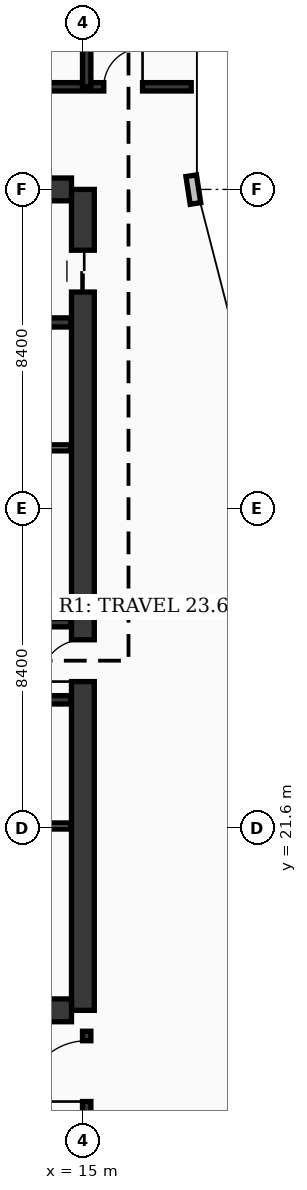
"""IFC4 building model, lengths in metres.
Left out: names, types, materials, properties, quantities, classifications, styles, units other than length and angle.
Written with IfcOpenShell. Run it as: python <this file> out.ifc"""

import sys

from ifc_helpers import new_model, si_unit, direction, frame, frame_2d, origin, place, context, subcontext, project, spatial, rectangle, extrude, element, fill, save


model = new_model("IFC4")
c1 = context("Model", 3, precision=1e-05, world=origin(), true_north=direction((0.0, 1.0)))
c2 = subcontext(c1, "Body", "Model", "MODEL_VIEW")
j1 = project(units=[si_unit("LENGTHUNIT", "METRE"), si_unit("PLANEANGLEUNIT", "RADIAN")], contexts=[c1])
p1 = place(None, origin())
s1 = spatial("IfcSite", under=j1, at=p1, CompositionType="ELEMENT")
p2 = place(p1, origin())
s2 = spatial("IfcBuilding", under=s1, at=p2, CompositionType="ELEMENT")
p3 = place(p2, frame((0.0, 0.0, 282.5)))
s3 = spatial("IfcBuildingStorey", under=s2, at=p3, CompositionType="ELEMENT", Elevation=282.5)
p4 = place(p3, frame((15.0, 16.8, 0.0), z_axis=(0.0, 0.0, 1.0), x_axis=(0.0, 1.0, 0.0)))
e1 = element("IfcWall", 1, at=p4, inside=s3, PredefinedType="SHEAR", context=c2, shape_type="SweptSolid", body=[
    extrude(rectangle(XDim=21.6, YDim=0.6, at=frame_2d((10.8, 0.0))), origin(), (0.0, 0.0, 1.0), 4.35),
])
p5 = place(p4, frame((8.65, 0.0, 0.0)))
e2 = element("IfcOpeningElement", 2, at=p5, cuts=e1, PredefinedType="OPENING", context=c2, shape_type="SweptSolid", body=[
    extrude(rectangle(XDim=1.1, YDim=2.2, at=frame_2d((0.55, 1.1))), frame((0.0, 0.31, 0.0), z_axis=(0.0, -1.0, 0.0), x_axis=(1.0, 0.0, 0.0)), (0.0, 0.0, 1.0), 0.62),
])
p6 = place(p4, frame((18.9, 0.0, 0.0)))
e3 = element("IfcOpeningElement", 3, at=p6, cuts=e1, PredefinedType="OPENING", context=c2, shape_type="SweptSolid", body=[
    extrude(rectangle(XDim=1.1, YDim=2.2, at=frame_2d((0.55, 1.1))), frame((0.0, 0.31, 0.0), z_axis=(0.0, -1.0, 0.0), x_axis=(1.0, 0.0, 0.0)), (0.0, 0.0, 1.0), 0.62),
])
p7 = place(p3, frame((4.5, 38.4, 0.0), z_axis=(0.0, 0.0, 1.0), x_axis=(1.0, 0.0, 0.0)))
e4 = element("IfcWall", 4, at=p7, inside=s3, PredefinedType="SHEAR", context=c2, shape_type="SweptSolid", body=[
    extrude(rectangle(XDim=10.2, YDim=0.6, at=frame_2d((5.1, 0.0))), origin(), (0.0, 0.0, 1.0), 4.35),
])
p8 = place(p7, frame((5.8, 0.0, 0.0)))
e5 = element("IfcOpeningElement", 5, at=p8, cuts=e4, PredefinedType="OPENING", context=c2, shape_type="SweptSolid", body=[
    extrude(rectangle(XDim=1.1, YDim=2.2, at=frame_2d((0.55, 1.1))), frame((0.0, 0.31, 0.0), z_axis=(0.0, -1.0, 0.0), x_axis=(1.0, 0.0, 0.0)), (0.0, 0.0, 1.0), 0.62),
])
p9 = place(p3, frame((4.5, 16.8, 0.0), z_axis=(0.0, 0.0, 1.0), x_axis=(1.0, 0.0, 0.0)))
e6 = element("IfcWall", 6, at=p9, inside=s3, PredefinedType="SHEAR", context=c2, shape_type="SweptSolid", body=[
    extrude(rectangle(XDim=10.2, YDim=0.6, at=frame_2d((5.1, 0.0))), origin(), (0.0, 0.0, 1.0), 4.35),
])
p10 = place(p3, frame((17.962, 38.03, 0.0), z_axis=(0.0, 0.0, 1.0), x_axis=(-0.15141125477, 0.988470855377, 0.0)))
e7 = element("IfcWall", 7, at=p10, inside=s3, PredefinedType="SOLIDWALL", context=c2, shape_type="SweptSolid", body=[
    extrude(rectangle(XDim=0.739, YDim=0.28, at=frame_2d((0.369, 0.0))), origin(), (0.0, 0.0, 1.0), 4.35),
])
p11 = place(p3, frame((9.68, 21.65, 0.0), z_axis=(0.0, 0.0, 1.0), x_axis=(1.0, 0.0, 0.0)))
e8 = element("IfcWall", 8, at=p11, inside=s3, PredefinedType="PARTITIONING", context=c2, shape_type="SweptSolid", body=[
    extrude(rectangle(XDim=5.0, YDim=0.16, at=frame_2d((2.5, 0.0))), origin(), (0.0, 0.0, 1.0), 4.35),
])
p12 = place(p11, frame((1.1, 0.0, 0.0)))
e9 = element("IfcOpeningElement", 9, at=p12, cuts=e8, PredefinedType="OPENING", context=c2, shape_type="SweptSolid", body=[
    extrude(rectangle(XDim=0.98, YDim=2.15, at=frame_2d((0.49, 1.075))), frame((0.0, 0.09, 0.0), z_axis=(0.0, -1.0, 0.0), x_axis=(1.0, 0.0, 0.0)), (0.0, 0.0, 1.0), 0.18),
])
p13 = place(p3, frame((9.68, 24.97, 0.0), z_axis=(0.0, 0.0, 1.0), x_axis=(1.0, 0.0, 0.0)))
e10 = element("IfcWall", 10, at=p13, inside=s3, PredefinedType="SOLIDWALL", context=c2, shape_type="SweptSolid", body=[
    extrude(rectangle(XDim=5.0, YDim=0.22, at=frame_2d((2.5, 0.0))), origin(), (0.0, 0.0, 1.0), 3.8),
])
p14 = place(p13, frame((0.9, 0.0, 0.0)))
e11 = element("IfcOpeningElement", 11, at=p14, cuts=e10, PredefinedType="OPENING", context=c2, shape_type="SweptSolid", body=[
    extrude(rectangle(XDim=0.98, YDim=2.15, at=frame_2d((0.49, 1.075))), frame((0.0, 0.12, 0.0), z_axis=(0.0, -1.0, 0.0), x_axis=(1.0, 0.0, 0.0)), (0.0, 0.0, 1.0), 0.24),
])
p15 = place(p3, frame((12.25, 27.0, 0.0), z_axis=(0.0, 0.0, 1.0), x_axis=(1.0, 0.0, 0.0)))
e12 = element("IfcWall", 12, at=p15, inside=s3, PredefinedType="SOLIDWALL", context=c2, shape_type="SweptSolid", body=[
    extrude(rectangle(XDim=2.43, YDim=0.22, at=frame_2d((1.215, 0.0))), origin(), (0.0, 0.0, 1.0), 4.35),
])
p16 = place(p3, frame((12.25, 31.6, 0.0), z_axis=(0.0, 0.0, 1.0), x_axis=(1.0, 0.0, 0.0)))
e13 = element("IfcWall", 13, at=p16, inside=s3, PredefinedType="PARTITIONING", context=c2, shape_type="SweptSolid", body=[
    extrude(rectangle(XDim=2.43, YDim=0.16, at=frame_2d((1.215, 0.0))), origin(), (0.0, 0.0, 1.0), 3.95),
])
p17 = place(p16, frame((0.55, 0.0, 0.0)))
e14 = element("IfcOpeningElement", 14, at=p17, cuts=e13, PredefinedType="OPENING", context=c2, shape_type="SweptSolid", body=[
    extrude(rectangle(XDim=0.98, YDim=2.15, at=frame_2d((0.49, 1.075))), frame((0.0, 0.09, 0.0), z_axis=(0.0, -1.0, 0.0), x_axis=(1.0, 0.0, 0.0)), (0.0, 0.0, 1.0), 0.18),
])
p18 = place(p3, frame((9.66, 34.9, 0.0), z_axis=(0.0, 0.0, 1.0), x_axis=(1.0, 0.0, 0.0)))
e15 = element("IfcWall", 15, at=p18, inside=s3, PredefinedType="SOLIDWALL", context=c2, shape_type="SweptSolid", body=[
    extrude(rectangle(XDim=5.02, YDim=0.24, at=frame_2d((2.51, 0.0))), origin(), (0.0, 0.0, 1.0), 4.35),
])
p19 = place(p3, frame((4.2, 41.1, 0.0), z_axis=(0.0, 0.0, 1.0), x_axis=(1.0, 0.0, 0.0)))
e16 = element("IfcWall", 16, at=p19, inside=s3, PredefinedType="SOLIDWALL", context=c2, shape_type="SweptSolid", body=[
    extrude(rectangle(XDim=13.65, YDim=0.22, at=frame_2d((6.825, 0.0))), origin(), (0.0, 0.0, 1.0), 3.8),
])
p20 = place(p19, frame((1.8, 0.0, 0.0)))
e17 = element("IfcOpeningElement", 17, at=p20, cuts=e16, PredefinedType="OPENING", context=c2, shape_type="SweptSolid", body=[
    extrude(rectangle(XDim=0.98, YDim=2.15, at=frame_2d((0.49, 1.075))), frame((0.0, 0.12, 0.0), z_axis=(0.0, -1.0, 0.0), x_axis=(1.0, 0.0, 0.0)), (0.0, 0.0, 1.0), 0.24),
])
p21 = place(p19, frame((6.8, 0.0, 0.0)))
e18 = element("IfcOpeningElement", 18, at=p21, cuts=e16, PredefinedType="OPENING", context=c2, shape_type="SweptSolid", body=[
    extrude(rectangle(XDim=1.15, YDim=2.2, at=frame_2d((0.575, 1.1))), frame((0.0, 0.12, 0.0), z_axis=(0.0, -1.0, 0.0), x_axis=(1.0, 0.0, 0.0)), (0.0, 0.0, 1.0), 0.24),
])
p22 = place(p19, frame((11.35, 0.0, 0.0)))
e19 = element("IfcOpeningElement", 19, at=p22, cuts=e16, PredefinedType="OPENING", context=c2, shape_type="SweptSolid", body=[
    extrude(rectangle(XDim=1.02, YDim=2.2, at=frame_2d((0.51, 1.1))), frame((0.0, 0.12, 0.0), z_axis=(0.0, -1.0, 0.0), x_axis=(1.0, 0.0, 0.0)), (0.0, 0.0, 1.0), 0.24),
])
p23 = place(p3, frame((15.1, 41.1, 0.0), z_axis=(0.0, 0.0, 1.0), x_axis=(0.0, 1.0, 0.0)))
e20 = element("IfcWall", 20, at=p23, inside=s3, PredefinedType="SOLIDWALL", context=c2, shape_type="SweptSolid", body=[
    extrude(rectangle(XDim=6.7, YDim=0.22, at=frame_2d((3.35, 0.0))), origin(), (0.0, 0.0, 1.0), 3.8),
])
p24 = place(p3, frame((15.1, 4.2, 0.0), z_axis=(0.0, 0.0, 1.0), x_axis=(0.0, 1.0, 0.0)))
e21 = element("IfcWall", 21, at=p24, inside=s3, PredefinedType="SOLIDWALL", context=c2, shape_type="SweptSolid", body=[
    extrude(rectangle(XDim=12.05, YDim=0.22, at=frame_2d((6.025, 0.0))), origin(), (0.0, 0.0, 1.0), 3.4),
])
p25 = place(p24, frame((10.2, 0.0, 0.0)))
e22 = element("IfcOpeningElement", 22, at=p25, cuts=e21, PredefinedType="OPENING", context=c2, shape_type="SweptSolid", body=[
    extrude(rectangle(XDim=1.6, YDim=2.35, at=frame_2d((0.8, 1.175))), frame((0.0, 0.12, 0.0), z_axis=(0.0, -1.0, 0.0), x_axis=(1.0, 0.0, 0.0)), (0.0, 0.0, 1.0), 0.24),
])
p26 = place(p22, origin())
e23 = element("IfcDoor", 23, at=p26, inside=s3, OperationType="SINGLE_SWING_RIGHT", PredefinedType="DOOR", context=c2, shape_type="SweptSolid", body=[
    extrude(rectangle(XDim=1.02, YDim=2.2, at=frame_2d((0.51, 1.1))), frame((0.0, 0.025, 0.0), z_axis=(0.0, -1.0, 0.0), x_axis=(1.0, 0.0, 0.0)), (0.0, 0.0, 1.0), 0.05),
])
fill(e19, e23)
p27 = place(p25, origin())
e24 = element("IfcDoor", 24, at=p27, inside=s3, OperationType="SINGLE_SWING_LEFT", PredefinedType="DOOR", context=c2, shape_type="SweptSolid", body=[
    extrude(rectangle(XDim=1.6, YDim=2.35, at=frame_2d((0.8, 1.175))), frame((0.0, 0.025, 0.0), z_axis=(0.0, -1.0, 0.0), x_axis=(1.0, 0.0, 0.0)), (0.0, 0.0, 1.0), 0.05),
])
fill(e22, e24)
p28 = place(p5, origin())
e25 = element("IfcDoor", 25, at=p28, inside=s3, OperationType="SINGLE_SWING_LEFT", PredefinedType="DOOR", context=c2, shape_type="SweptSolid", body=[
    extrude(rectangle(XDim=1.1, YDim=2.2, at=frame_2d((0.55, 1.1))), frame((0.0, 0.025, 0.0), z_axis=(0.0, -1.0, 0.0), x_axis=(1.0, 0.0, 0.0)), (0.0, 0.0, 1.0), 0.05),
])
fill(e2, e25)
p29 = place(p6, origin())
e26 = element("IfcDoor", 26, at=p29, inside=s3, OperationType="DOUBLE_DOOR_SLIDING", PredefinedType="DOOR", context=c2, shape_type="SweptSolid", body=[
    extrude(rectangle(XDim=1.1, YDim=2.2, at=frame_2d((0.55, 1.1))), frame((0.0, 0.025, 0.0), z_axis=(0.0, -1.0, 0.0), x_axis=(1.0, 0.0, 0.0)), (0.0, 0.0, 1.0), 0.05),
])
fill(e3, e26)
save(model, sys.argv[1])
